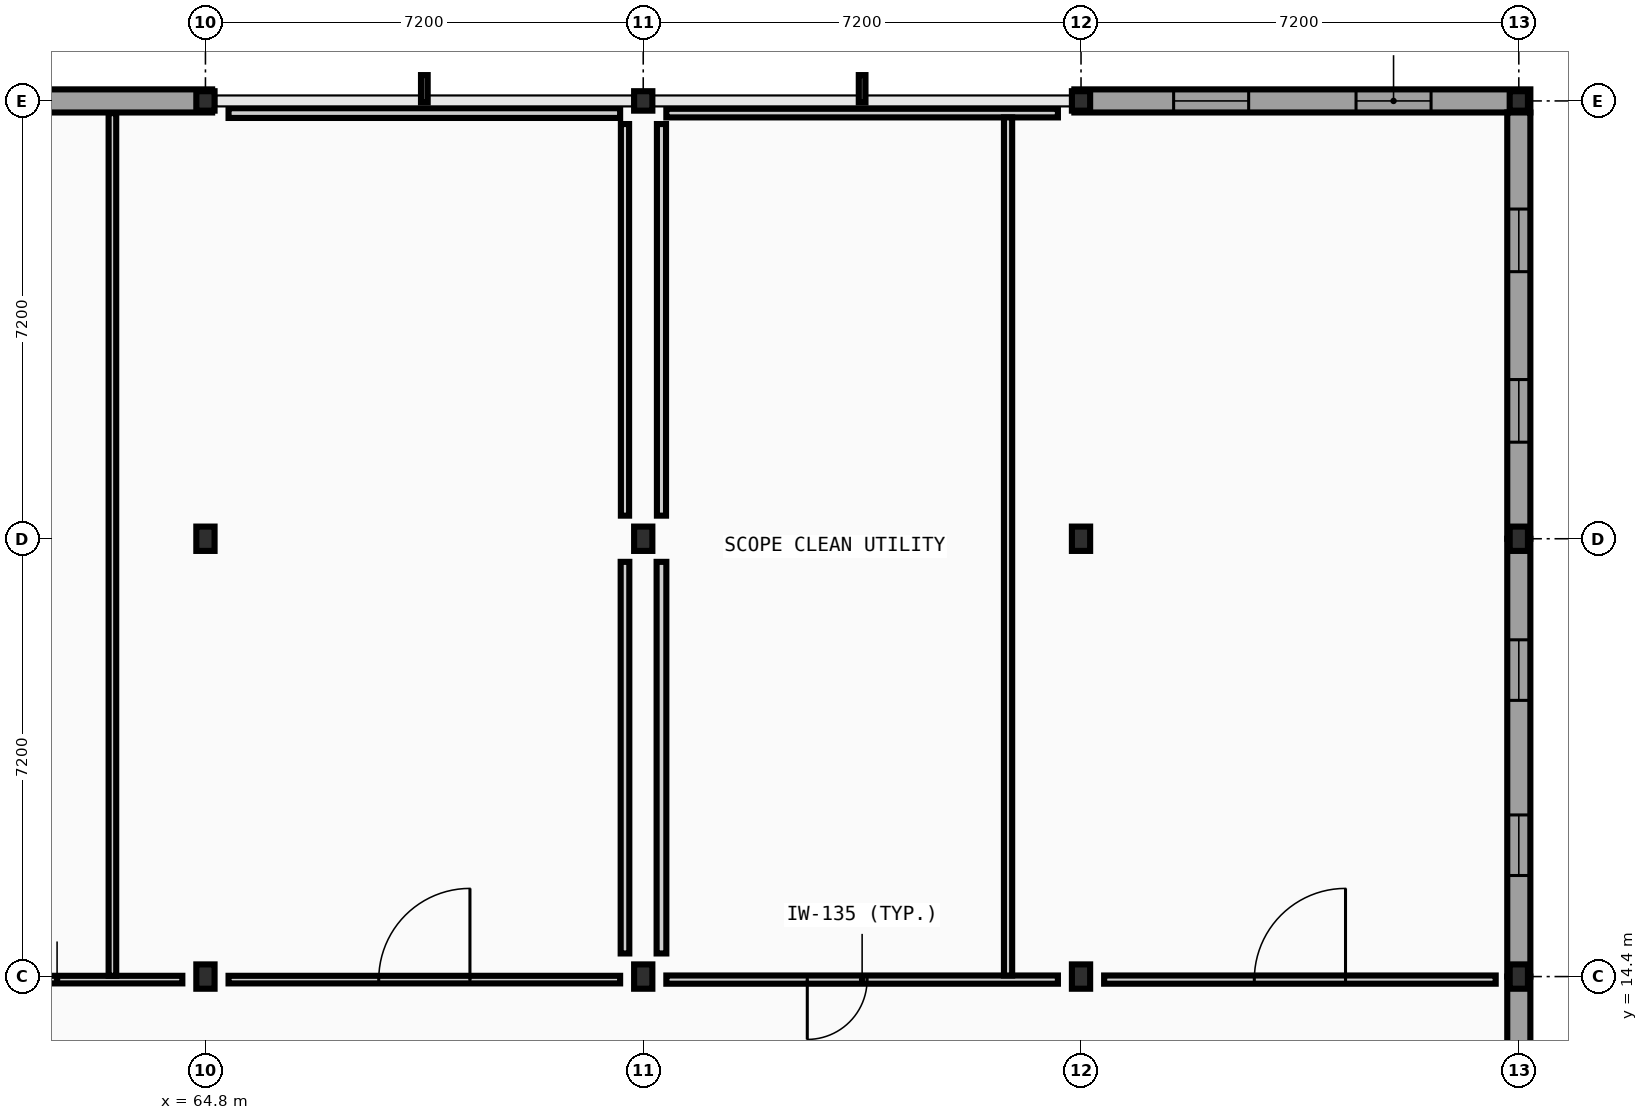
"""IFC4 building model, lengths in metres.
Left out: names, types, materials, properties, quantities, classifications, styles, units other than length and angle.
Written with IfcOpenShell. Run it as: python <this file> out.ifc"""

import sys

from ifc_helpers import new_model, si_unit, direction, frame, frame_2d, origin, origin_2d, place, context, subcontext, project, spatial, rectangle, i_section, extrude, element, fill, save


model = new_model("IFC4")
c1 = context("Model", 3, precision=1e-05, world=origin(), true_north=direction((0.0, 1.0)))
c2 = subcontext(c1, "Body", "Model", "MODEL_VIEW")
j1 = project(units=[si_unit("LENGTHUNIT", "METRE"), si_unit("PLANEANGLEUNIT", "RADIAN")], contexts=[c1])
p1 = place(None, origin())
s1 = spatial("IfcSite", under=j1, at=p1, CompositionType="ELEMENT")
p2 = place(p1, origin())
s2 = spatial("IfcBuilding", under=s1, at=p2, CompositionType="ELEMENT")
p3 = place(p2, frame((0.0, 0.0, 5.2)))
s3 = spatial("IfcBuildingStorey", under=s2, at=p3, CompositionType="ELEMENT", Elevation=5.2)
for number, where, z_axis, x_axis in (
    (1, (64.8, 14.4, 0.0), (0.0, 0.0, 1.0), (1.0, 0.0, 0.0)),
    (2, (64.8, 21.6, 0.0), (0.0, 0.0, 1.0), (1.0, 0.0, 0.0)),
):
    element("IfcColumn", number, at=place(p3, frame(where, z_axis=z_axis, x_axis=x_axis)), inside=s3, PredefinedType="COLUMN", context=c2, shape_type="SweptSolid", body=[
        extrude(i_section(OverallWidth=0.3, OverallDepth=0.4, WebThickness=0.013, FlangeThickness=0.024, FilletRadius=0.027, at=origin_2d()), origin(), (0.0, 0.0, 1.0), 4.4),
    ])
p4 = place(p3, frame((64.8, 28.8, 0.0), z_axis=(0.0, 0.0, 1.0), x_axis=(1.0, 0.0, 0.0)))
e3 = element("IfcColumn", 3, at=p4, inside=s3, PredefinedType="COLUMN", context=c2, shape_type="SweptSolid", body=[
    extrude(i_section(OverallWidth=0.3, OverallDepth=0.32, WebThickness=0.011, FlangeThickness=0.021, FilletRadius=0.027, at=origin_2d()), origin(), (0.0, 0.0, 1.0), 4.4),
])
for number, where, z_axis, x_axis in (
    (4, (72.0, 14.4, 0.0), (0.0, 0.0, 1.0), (1.0, 0.0, 0.0)),
    (5, (72.0, 21.6, 0.0), (0.0, 0.0, 1.0), (1.0, 0.0, 0.0)),
):
    element("IfcColumn", number, at=place(p3, frame(where, z_axis=z_axis, x_axis=x_axis)), inside=s3, PredefinedType="COLUMN", context=c2, shape_type="SweptSolid", body=[
        extrude(i_section(OverallWidth=0.3, OverallDepth=0.4, WebThickness=0.013, FlangeThickness=0.024, FilletRadius=0.027, at=origin_2d()), origin(), (0.0, 0.0, 1.0), 4.4),
    ])
p5 = place(p3, frame((72.0, 28.8, 0.0), z_axis=(0.0, 0.0, 1.0), x_axis=(1.0, 0.0, 0.0)))
e6 = element("IfcColumn", 6, at=p5, inside=s3, PredefinedType="COLUMN", context=c2, shape_type="SweptSolid", body=[
    extrude(i_section(OverallWidth=0.3, OverallDepth=0.32, WebThickness=0.011, FlangeThickness=0.021, FilletRadius=0.027, at=origin_2d()), origin(), (0.0, 0.0, 1.0), 4.4),
])
for number, where, z_axis, x_axis in (
    (7, (79.2, 14.4, 0.0), (0.0, 0.0, 1.0), (1.0, 0.0, 0.0)),
    (8, (79.2, 21.6, 0.0), (0.0, 0.0, 1.0), (1.0, 0.0, 0.0)),
):
    element("IfcColumn", number, at=place(p3, frame(where, z_axis=z_axis, x_axis=x_axis)), inside=s3, PredefinedType="COLUMN", context=c2, shape_type="SweptSolid", body=[
        extrude(i_section(OverallWidth=0.3, OverallDepth=0.4, WebThickness=0.013, FlangeThickness=0.024, FilletRadius=0.027, at=origin_2d()), origin(), (0.0, 0.0, 1.0), 4.4),
    ])
p6 = place(p3, frame((79.2, 28.8, 0.0), z_axis=(0.0, 0.0, 1.0), x_axis=(1.0, 0.0, 0.0)))
e9 = element("IfcColumn", 9, at=p6, inside=s3, PredefinedType="COLUMN", context=c2, shape_type="SweptSolid", body=[
    extrude(i_section(OverallWidth=0.3, OverallDepth=0.32, WebThickness=0.011, FlangeThickness=0.021, FilletRadius=0.027, at=origin_2d()), origin(), (0.0, 0.0, 1.0), 4.4),
])
for number, where, z_axis, x_axis in (
    (10, (86.4, 14.4, 0.0), (0.0, 0.0, 1.0), (1.0, 0.0, 0.0)),
    (11, (86.4, 21.6, 0.0), (0.0, 0.0, 1.0), (1.0, 0.0, 0.0)),
):
    element("IfcColumn", number, at=place(p3, frame(where, z_axis=z_axis, x_axis=x_axis)), inside=s3, PredefinedType="COLUMN", context=c2, shape_type="SweptSolid", body=[
        extrude(i_section(OverallWidth=0.3, OverallDepth=0.4, WebThickness=0.013, FlangeThickness=0.024, FilletRadius=0.027, at=origin_2d()), origin(), (0.0, 0.0, 1.0), 4.4),
    ])
p7 = place(p3, frame((86.4, 28.8, 0.0), z_axis=(0.0, 0.0, 1.0), x_axis=(1.0, 0.0, 0.0)))
e12 = element("IfcColumn", 12, at=p7, inside=s3, PredefinedType="COLUMN", context=c2, shape_type="SweptSolid", body=[
    extrude(i_section(OverallWidth=0.3, OverallDepth=0.32, WebThickness=0.011, FlangeThickness=0.021, FilletRadius=0.027, at=origin_2d()), origin(), (0.0, 0.0, 1.0), 4.4),
])
p8 = place(p3, frame((64.91, 28.8, 0.0), z_axis=(0.0, 0.0, 1.0), x_axis=(-1.0, 0.0, 0.0)))
e13 = element("IfcWall", 13, at=p8, inside=s3, PredefinedType="STANDARD", context=c2, shape_type="SweptSolid", body=[
    extrude(rectangle(XDim=6.4, YDim=0.38, at=frame_2d((3.2, 0.0))), origin(), (0.0, 0.0, 1.0), 3.88),
])
p9 = place(p3, frame((86.59, 28.8, 0.0), z_axis=(0.0, 0.0, 1.0), x_axis=(-1.0, 0.0, 0.0)))
e14 = element("IfcWall", 14, at=p9, inside=s3, PredefinedType="STANDARD", context=c2, shape_type="SweptSolid", body=[
    extrude(rectangle(XDim=7.5, YDim=0.38, at=frame_2d((3.75, 0.0))), origin(), (0.0, 0.0, 1.0), 3.88),
])
p10 = place(p9, frame((1.633, 0.0, 0.95)))
e15 = element("IfcOpeningElement", 15, at=p10, cuts=e14, PredefinedType="OPENING", context=c2, shape_type="SweptSolid", body=[
    extrude(rectangle(XDim=1.234, YDim=1.26, at=frame_2d((0.617, 0.63))), frame((0.0, 0.2, 0.0), z_axis=(0.0, -1.0, 0.0), x_axis=(1.0, 0.0, 0.0)), (0.0, 0.0, 1.0), 0.4),
])
p11 = place(p9, frame((4.633, 0.0, 0.95)))
e16 = element("IfcOpeningElement", 16, at=p11, cuts=e14, PredefinedType="OPENING", context=c2, shape_type="SweptSolid", body=[
    extrude(rectangle(XDim=1.234, YDim=1.26, at=frame_2d((0.617, 0.63))), frame((0.0, 0.2, 0.0), z_axis=(0.0, -1.0, 0.0), x_axis=(1.0, 0.0, 0.0)), (0.0, 0.0, 1.0), 0.4),
])
p12 = place(p3, frame((86.4, 8.9, 0.0), z_axis=(0.0, 0.0, 1.0), x_axis=(0.0, 1.0, 0.0)))
e17 = element("IfcWall", 17, at=p12, inside=s3, PredefinedType="STANDARD", context=c2, shape_type="SweptSolid", body=[
    extrude(rectangle(XDim=5.5, YDim=0.38, at=frame_2d((2.75, 0.0))), origin(), (0.0, 0.0, 1.0), 4.185),
])
p13 = place(p3, frame((86.4, 14.4, 0.0), z_axis=(0.0, 0.0, 1.0), x_axis=(0.0, 1.0, 0.0)))
e18 = element("IfcWall", 18, at=p13, inside=s3, PredefinedType="STANDARD", context=c2, shape_type="SweptSolid", body=[
    extrude(rectangle(XDim=7.2, YDim=0.38, at=frame_2d((3.6, 0.0))), origin(), (0.0, 0.0, 1.0), 3.81),
])
p14 = place(p13, frame((1.662, 0.0, 0.95)))
e19 = element("IfcOpeningElement", 19, at=p14, cuts=e18, PredefinedType="OPENING", context=c2, shape_type="SweptSolid", body=[
    extrude(rectangle(XDim=0.996, YDim=1.296, at=frame_2d((0.498, 0.648))), frame((0.0, 0.2, 0.0), z_axis=(0.0, -1.0, 0.0), x_axis=(1.0, 0.0, 0.0)), (0.0, 0.0, 1.0), 0.4),
])
p15 = place(p13, frame((4.542, 0.0, 0.95)))
e20 = element("IfcOpeningElement", 20, at=p15, cuts=e18, PredefinedType="OPENING", context=c2, shape_type="SweptSolid", body=[
    extrude(rectangle(XDim=0.996, YDim=1.296, at=frame_2d((0.498, 0.648))), frame((0.0, 0.2, 0.0), z_axis=(0.0, -1.0, 0.0), x_axis=(1.0, 0.0, 0.0)), (0.0, 0.0, 1.0), 0.4),
])
p16 = place(p3, frame((86.4, 21.6, 0.0), z_axis=(0.0, 0.0, 1.0), x_axis=(0.0, 1.0, 0.0)))
e21 = element("IfcWall", 21, at=p16, inside=s3, PredefinedType="STANDARD", context=c2, shape_type="SweptSolid", body=[
    extrude(rectangle(XDim=7.01, YDim=0.38, at=frame_2d((3.505, 0.0))), origin(), (0.0, 0.0, 1.0), 3.81),
])
p17 = place(p16, frame((1.588, 0.0, 0.95)))
e22 = element("IfcOpeningElement", 22, at=p17, cuts=e21, PredefinedType="OPENING", context=c2, shape_type="SweptSolid", body=[
    extrude(rectangle(XDim=1.03, YDim=1.296, at=frame_2d((0.515, 0.648))), frame((0.0, 0.2, 0.0), z_axis=(0.0, -1.0, 0.0), x_axis=(1.0, 0.0, 0.0)), (0.0, 0.0, 1.0), 0.4),
])
p18 = place(p16, frame((4.392, 0.0, 0.95)))
e23 = element("IfcOpeningElement", 23, at=p18, cuts=e21, PredefinedType="OPENING", context=c2, shape_type="SweptSolid", body=[
    extrude(rectangle(XDim=1.03, YDim=1.296, at=frame_2d((0.515, 0.648))), frame((0.0, 0.2, 0.0), z_axis=(0.0, -1.0, 0.0), x_axis=(1.0, 0.0, 0.0)), (0.0, 0.0, 1.0), 0.4),
])
p19 = place(p3, frame((58.7, 14.35, 0.0), z_axis=(0.0, 0.0, 1.0), x_axis=(1.0, 0.0, 0.0)))
e24 = element("IfcWall", 24, at=p19, inside=s3, PredefinedType="PARTITIONING", context=c2, shape_type="SweptSolid", body=[
    extrude(rectangle(XDim=5.72, YDim=0.125, at=frame_2d((2.86, 0.0))), origin(), (0.0, 0.0, 1.0), 3.88),
])
p20 = place(p19, frame((1.835, 0.0, 0.0)))
e25 = element("IfcOpeningElement", 25, at=p20, cuts=e24, PredefinedType="OPENING", context=c2, shape_type="SweptSolid", body=[
    extrude(rectangle(XDim=0.9, YDim=2.1, at=frame_2d((0.45, 1.05))), frame((0.0, 0.073, 0.0), z_axis=(0.0, -1.0, 0.0), x_axis=(1.0, 0.0, 0.0)), (0.0, 0.0, 1.0), 0.145),
])
p21 = place(p3, frame((65.18, 14.35, 0.0), z_axis=(0.0, 0.0, 1.0), x_axis=(1.0, 0.0, 0.0)))
e26 = element("IfcWall", 26, at=p21, inside=s3, PredefinedType="PARTITIONING", context=c2, shape_type="SweptSolid", body=[
    extrude(rectangle(XDim=6.44, YDim=0.125, at=frame_2d((3.22, 0.0))), origin(), (0.0, 0.0, 1.0), 3.88),
])
p22 = place(p21, frame((2.47, 0.0, 0.0)))
e27 = element("IfcOpeningElement", 27, at=p22, cuts=e26, PredefinedType="OPENING", context=c2, shape_type="SweptSolid", body=[
    extrude(rectangle(XDim=1.5, YDim=2.2, at=frame_2d((0.75, 1.1))), frame((0.0, 0.073, 0.0), z_axis=(0.0, -1.0, 0.0), x_axis=(1.0, 0.0, 0.0)), (0.0, 0.0, 1.0), 0.145),
])
p23 = place(p3, frame((72.38, 14.35, 0.0), z_axis=(0.0, 0.0, 1.0), x_axis=(1.0, 0.0, 0.0)))
e28 = element("IfcWall", 28, at=p23, inside=s3, PredefinedType="PARTITIONING", context=c2, shape_type="SweptSolid", body=[
    extrude(rectangle(XDim=6.44, YDim=0.135, at=frame_2d((3.22, 0.0))), origin(), (0.0, 0.0, 1.0), 3.88),
])
p24 = place(p23, frame((2.318, 0.0, 0.0)))
e29 = element("IfcOpeningElement", 29, at=p24, cuts=e28, PredefinedType="OPENING", context=c2, shape_type="SweptSolid", body=[
    extrude(rectangle(XDim=0.984, YDim=2.124, at=frame_2d((0.492, 1.062))), frame((0.0, 0.078, 0.0), z_axis=(0.0, -1.0, 0.0), x_axis=(1.0, 0.0, 0.0)), (0.0, 0.0, 1.0), 0.155),
])
p25 = place(p3, frame((79.58, 14.35, 0.0), z_axis=(0.0, 0.0, 1.0), x_axis=(1.0, 0.0, 0.0)))
e30 = element("IfcWall", 30, at=p25, inside=s3, PredefinedType="PARTITIONING", context=c2, shape_type="SweptSolid", body=[
    extrude(rectangle(XDim=6.44, YDim=0.135, at=frame_2d((3.22, 0.0))), origin(), (0.0, 0.0, 1.0), 3.88),
])
p26 = place(p25, frame((2.47, 0.0, 0.0)))
e31 = element("IfcOpeningElement", 31, at=p26, cuts=e30, PredefinedType="OPENING", context=c2, shape_type="SweptSolid", body=[
    extrude(rectangle(XDim=1.5, YDim=2.2, at=frame_2d((0.75, 1.1))), frame((0.0, 0.078, 0.0), z_axis=(0.0, -1.0, 0.0), x_axis=(1.0, 0.0, 0.0)), (0.0, 0.0, 1.0), 0.155),
])
p27 = place(p3, frame((65.18, 28.6, 0.0), z_axis=(0.0, 0.0, 1.0), x_axis=(1.0, 0.0, 0.0)))
e32 = element("IfcWall", 32, at=p27, inside=s3, PredefinedType="PARTITIONING", context=c2, shape_type="SweptSolid", body=[
    extrude(rectangle(XDim=6.44, YDim=0.16, at=frame_2d((3.22, 0.0))), origin(), (0.0, 0.0, 1.0), 3.88),
])
p28 = place(p3, frame((72.38, 28.6, 0.0), z_axis=(0.0, 0.0, 1.0), x_axis=(1.0, 0.0, 0.0)))
e33 = element("IfcWall", 33, at=p28, inside=s3, PredefinedType="PARTITIONING", context=c2, shape_type="SweptSolid", body=[
    extrude(rectangle(XDim=6.44, YDim=0.142, at=frame_2d((3.22, 0.0))), origin(), (0.0, 0.0, 1.0), 3.88),
])
p29 = place(p3, frame((63.27, 14.413, 0.0), z_axis=(0.0, 0.0, 1.0), x_axis=(0.0, 1.0, 0.0)))
e34 = element("IfcWall", 34, at=p29, inside=s3, PredefinedType="PARTITIONING", context=c2, shape_type="SweptSolid", body=[
    extrude(rectangle(XDim=14.188, YDim=0.125, at=frame_2d((7.094, 0.0))), origin(), (0.0, 0.0, 1.0), 4.185),
])
p30 = place(p3, frame((71.7, 14.78, 0.0), z_axis=(0.0, 0.0, 1.0), x_axis=(0.0, 1.0, 0.0)))
e35 = element("IfcWall", 35, at=p30, inside=s3, PredefinedType="PARTITIONING", context=c2, shape_type="SweptSolid", body=[
    extrude(rectangle(XDim=6.44, YDim=0.142, at=frame_2d((3.22, 0.0))), origin(), (0.0, 0.0, 1.0), 3.88),
])
p31 = place(p3, frame((71.7, 21.98, 0.0), z_axis=(0.0, 0.0, 1.0), x_axis=(0.0, 1.0, 0.0)))
e36 = element("IfcWall", 36, at=p31, inside=s3, PredefinedType="PARTITIONING", context=c2, shape_type="SweptSolid", body=[
    extrude(rectangle(XDim=6.44, YDim=0.135, at=frame_2d((3.22, 0.0))), origin(), (0.0, 0.0, 1.0), 4.185),
])
p32 = place(p3, frame((72.3, 14.78, 0.0), z_axis=(0.0, 0.0, 1.0), x_axis=(0.0, 1.0, 0.0)))
e37 = element("IfcWall", 37, at=p32, inside=s3, PredefinedType="PARTITIONING", context=c2, shape_type="SweptSolid", body=[
    extrude(rectangle(XDim=6.44, YDim=0.16, at=frame_2d((3.22, 0.0))), origin(), (0.0, 0.0, 1.0), 3.88),
])
p33 = place(p3, frame((72.3, 21.98, 0.0), z_axis=(0.0, 0.0, 1.0), x_axis=(0.0, 1.0, 0.0)))
e38 = element("IfcWall", 38, at=p33, inside=s3, PredefinedType="PARTITIONING", context=c2, shape_type="SweptSolid", body=[
    extrude(rectangle(XDim=6.44, YDim=0.15, at=frame_2d((3.22, 0.0))), origin(), (0.0, 0.0, 1.0), 3.88),
])
p34 = place(p3, frame((78.0, 14.417, 0.0), z_axis=(0.0, 0.0, 1.0), x_axis=(0.0, 1.0, 0.0)))
e39 = element("IfcWall", 39, at=p34, inside=s3, PredefinedType="PARTITIONING", context=c2, shape_type="SweptSolid", body=[
    extrude(rectangle(XDim=14.112, YDim=0.135, at=frame_2d((7.056, 0.0))), origin(), (0.0, 0.0, 1.0), 4.185),
])
p35 = place(p10, origin())
e40 = element("IfcWindow", 40, at=p35, inside=s3, PartitioningType="SINGLE_PANEL", PredefinedType="WINDOW", context=c2, shape_type="SweptSolid", body=[
    extrude(rectangle(XDim=1.234, YDim=1.26, at=frame_2d((0.617, 0.63))), frame((0.0, 0.03, 0.0), z_axis=(0.0, -1.0, 0.0), x_axis=(1.0, 0.0, 0.0)), (0.0, 0.0, 1.0), 0.06),
])
fill(e15, e40)
p36 = place(p11, origin())
e41 = element("IfcWindow", 41, at=p36, inside=s3, PartitioningType="SINGLE_PANEL", PredefinedType="WINDOW", context=c2, shape_type="SweptSolid", body=[
    extrude(rectangle(XDim=1.234, YDim=1.26, at=frame_2d((0.617, 0.63))), frame((0.0, 0.03, 0.0), z_axis=(0.0, -1.0, 0.0), x_axis=(1.0, 0.0, 0.0)), (0.0, 0.0, 1.0), 0.06),
])
fill(e16, e41)
p37 = place(p14, origin())
e42 = element("IfcWindow", 42, at=p37, inside=s3, PartitioningType="SINGLE_PANEL", PredefinedType="WINDOW", context=c2, shape_type="SweptSolid", body=[
    extrude(rectangle(XDim=0.996, YDim=1.296, at=frame_2d((0.498, 0.648))), frame((0.0, 0.03, 0.0), z_axis=(0.0, -1.0, 0.0), x_axis=(1.0, 0.0, 0.0)), (0.0, 0.0, 1.0), 0.06),
])
fill(e19, e42)
p38 = place(p15, origin())
e43 = element("IfcWindow", 43, at=p38, inside=s3, PartitioningType="SINGLE_PANEL", PredefinedType="WINDOW", context=c2, shape_type="SweptSolid", body=[
    extrude(rectangle(XDim=0.996, YDim=1.296, at=frame_2d((0.498, 0.648))), frame((0.0, 0.03, 0.0), z_axis=(0.0, -1.0, 0.0), x_axis=(1.0, 0.0, 0.0)), (0.0, 0.0, 1.0), 0.06),
])
fill(e20, e43)
p39 = place(p17, origin())
e44 = element("IfcWindow", 44, at=p39, inside=s3, PartitioningType="SINGLE_PANEL", PredefinedType="WINDOW", context=c2, shape_type="SweptSolid", body=[
    extrude(rectangle(XDim=1.03, YDim=1.296, at=frame_2d((0.515, 0.648))), frame((0.0, 0.03, 0.0), z_axis=(0.0, -1.0, 0.0), x_axis=(1.0, 0.0, 0.0)), (0.0, 0.0, 1.0), 0.06),
])
fill(e22, e44)
p40 = place(p18, origin())
e45 = element("IfcWindow", 45, at=p40, inside=s3, PartitioningType="SINGLE_PANEL", PredefinedType="WINDOW", context=c2, shape_type="SweptSolid", body=[
    extrude(rectangle(XDim=1.03, YDim=1.296, at=frame_2d((0.515, 0.648))), frame((0.0, 0.03, 0.0), z_axis=(0.0, -1.0, 0.0), x_axis=(1.0, 0.0, 0.0)), (0.0, 0.0, 1.0), 0.06),
])
fill(e23, e45)
p41 = place(p24, frame((0.984, 0.0, 0.0), z_axis=(0.0, 0.0, 1.0), x_axis=(-1.0, 0.0, 0.0)))
e46 = element("IfcDoor", 46, at=p41, inside=s3, OperationType="SINGLE_SWING_LEFT", PredefinedType="DOOR", context=c2, shape_type="SweptSolid", body=[
    extrude(rectangle(XDim=0.984, YDim=2.124, at=frame_2d((0.492, 1.062))), frame((0.0, 0.025, 0.0), z_axis=(0.0, -1.0, 0.0), x_axis=(1.0, 0.0, 0.0)), (0.0, 0.0, 1.0), 0.05),
])
fill(e29, e46)
p42 = place(p26, frame((1.5, 0.0, 0.0), z_axis=(0.0, 0.0, 1.0), x_axis=(-1.0, 0.0, 0.0)))
e47 = element("IfcDoor", 47, at=p42, inside=s3, OperationType="DOUBLE_DOOR_SINGLE_SWING", PredefinedType="DOOR", context=c2, shape_type="SweptSolid", body=[
    extrude(rectangle(XDim=1.5, YDim=2.2, at=frame_2d((0.75, 1.1))), frame((0.0, 0.025, 0.0), z_axis=(0.0, -1.0, 0.0), x_axis=(1.0, 0.0, 0.0)), (0.0, 0.0, 1.0), 0.05),
])
fill(e31, e47)
p43 = place(p22, frame((1.5, 0.0, 0.0), z_axis=(0.0, 0.0, 1.0), x_axis=(-1.0, 0.0, 0.0)))
e48 = element("IfcDoor", 48, at=p43, inside=s3, OperationType="DOUBLE_DOOR_SINGLE_SWING", PredefinedType="DOOR", context=c2, shape_type="SweptSolid", body=[
    extrude(rectangle(XDim=1.5, YDim=2.2, at=frame_2d((0.75, 1.1))), frame((0.0, 0.025, 0.0), z_axis=(0.0, -1.0, 0.0), x_axis=(1.0, 0.0, 0.0)), (0.0, 0.0, 1.0), 0.05),
])
fill(e27, e48)
save(model, sys.argv[1])
